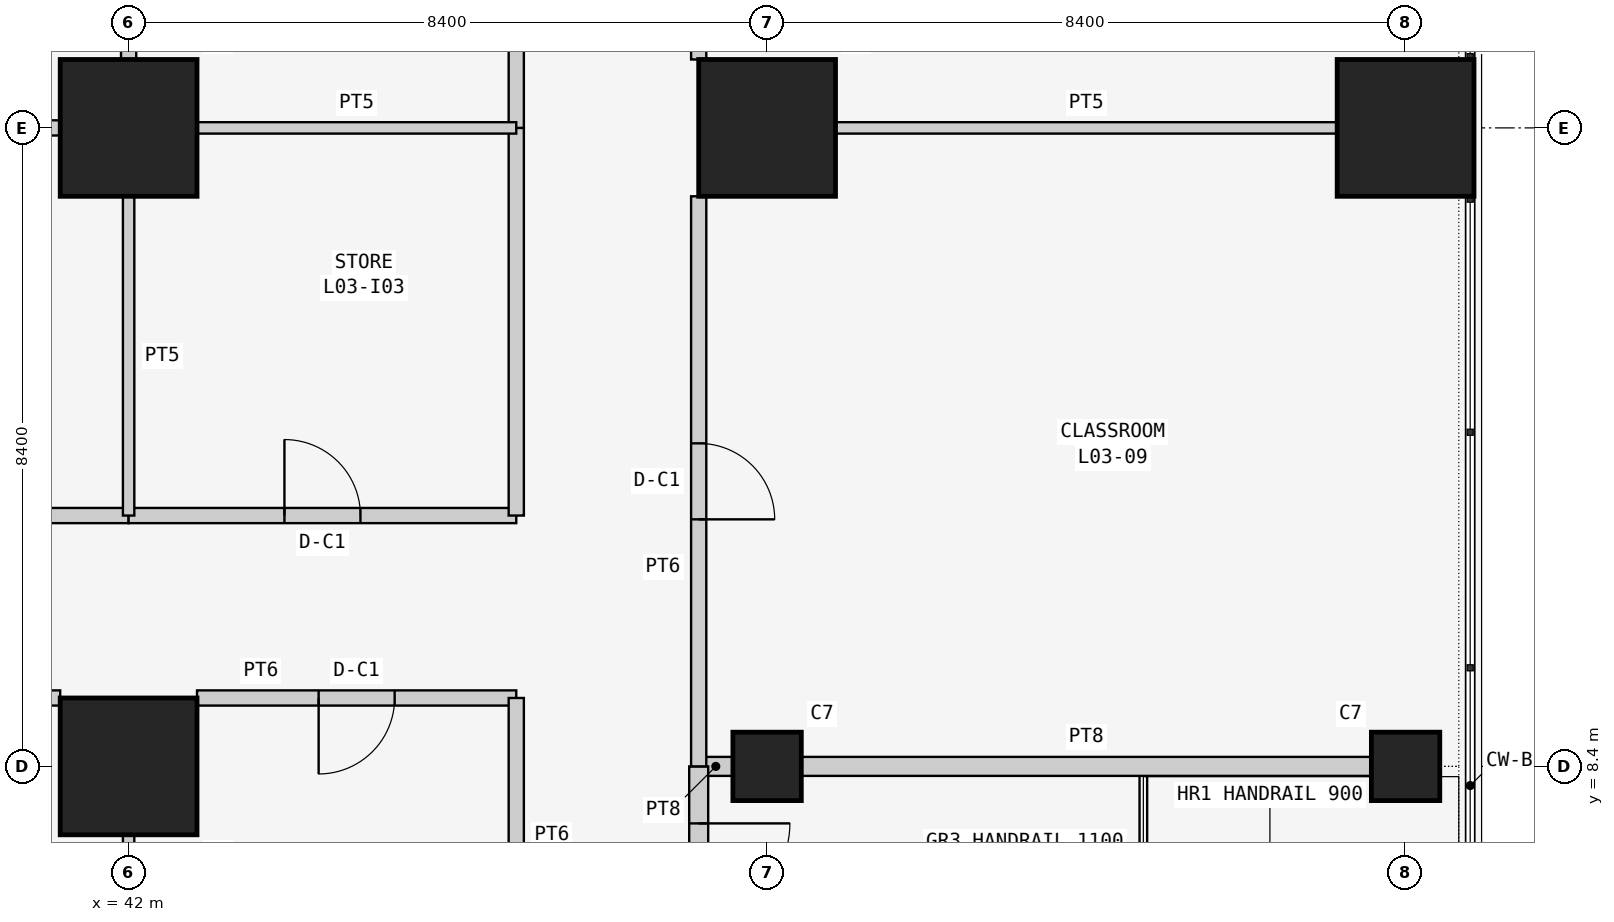
"""IFC4 building model, lengths in metres.
Left out: names, types, materials, properties, quantities, classifications, styles, units other than length and angle.
Written with IfcOpenShell. Run it as: python <this file> out.ifc"""

import sys

from ifc_helpers import new_model, si_unit, direction, frame, frame_2d, origin, origin_2d, place, context, subcontext, project, spatial, rectangle, extrude, element, fill, save


model = new_model("IFC4")
c1 = context("Model", 3, precision=1e-05, world=origin(), true_north=direction((0.0, 1.0)))
c2 = subcontext(c1, "Body", "Model", "MODEL_VIEW")
j1 = project(units=[si_unit("LENGTHUNIT", "METRE"), si_unit("PLANEANGLEUNIT", "RADIAN")], contexts=[c1])
p1 = place(None, origin())
s1 = spatial("IfcSite", under=j1, at=p1, CompositionType="ELEMENT")
p2 = place(p1, origin())
s2 = spatial("IfcBuilding", under=s1, at=p2, CompositionType="ELEMENT")
p3 = place(p2, frame((0.0, 0.0, 15.0)))
s3 = spatial("IfcBuildingStorey", under=s2, at=p3, CompositionType="ELEMENT", Elevation=15.0)
for number, where, z_axis, x_axis in (
    (1, (42.0, 8.4, 0.0), (0.0, 0.0, 1.0), (1.0, 0.0, 0.0)),
    (2, (42.0, 16.8, 0.0), (0.0, 0.0, 1.0), (1.0, 0.0, 0.0)),
):
    element("IfcColumn", number, at=place(p3, frame(where, z_axis=z_axis, x_axis=x_axis)), inside=s3, PredefinedType="COLUMN", context=c2, shape_type="SweptSolid", body=[
        extrude(rectangle(XDim=1.8, YDim=1.8, at=origin_2d()), origin(), (0.0, 0.0, 1.0), 4.5),
    ])
p4 = place(p3, frame((50.4, 8.4, 0.0), z_axis=(0.0, 0.0, 1.0), x_axis=(1.0, 0.0, 0.0)))
e3 = element("IfcColumn", 3, at=p4, inside=s3, PredefinedType="COLUMN", context=c2, shape_type="SweptSolid", body=[
    extrude(rectangle(XDim=0.9, YDim=0.9, at=origin_2d()), origin(), (0.0, 0.0, 1.0), 4.5),
])
p5 = place(p3, frame((50.4, 16.8, 0.0), z_axis=(0.0, 0.0, 1.0), x_axis=(1.0, 0.0, 0.0)))
e4 = element("IfcColumn", 4, at=p5, inside=s3, PredefinedType="COLUMN", context=c2, shape_type="SweptSolid", body=[
    extrude(rectangle(XDim=1.8, YDim=1.8, at=origin_2d()), origin(), (0.0, 0.0, 1.0), 4.5),
])
p6 = place(p3, frame((58.8, 8.4, 0.0), z_axis=(0.0, 0.0, 1.0), x_axis=(1.0, 0.0, 0.0)))
e5 = element("IfcColumn", 5, at=p6, inside=s3, PredefinedType="COLUMN", context=c2, shape_type="SweptSolid", body=[
    extrude(rectangle(XDim=0.9, YDim=0.9, at=origin_2d()), origin(), (0.0, 0.0, 1.0), 4.5),
])
p7 = place(p3, frame((58.8, 16.8, 0.0), z_axis=(0.0, 0.0, 1.0), x_axis=(1.0, 0.0, 0.0)))
e6 = element("IfcColumn", 6, at=p7, inside=s3, PredefinedType="COLUMN", context=c2, shape_type="SweptSolid", body=[
    extrude(rectangle(XDim=1.8, YDim=1.8, at=origin_2d()), origin(), (0.0, 0.0, 1.0), 4.5),
])
p8 = place(p3, frame((49.5, 8.4, 0.0), z_axis=(0.0, 0.0, 1.0), x_axis=(1.0, 0.0, 0.0)))
e7 = element("IfcWall", 7, at=p8, inside=s3, PredefinedType="SOLIDWALL", context=c2, shape_type="SweptSolid", body=[
    extrude(rectangle(XDim=0.45, YDim=0.25, at=frame_2d((0.225, 0.0))), origin(), (0.0, 0.0, 1.0), 3.543),
])
p9 = place(p3, frame((50.85, 8.4, 0.0), z_axis=(0.0, 0.0, 1.0), x_axis=(1.0, 0.0, 0.0)))
e8 = element("IfcWall", 8, at=p9, inside=s3, PredefinedType="SOLIDWALL", context=c2, shape_type="SweptSolid", body=[
    extrude(rectangle(XDim=7.5, YDim=0.25, at=frame_2d((3.75, 0.0))), origin(), (0.0, 0.0, 1.0), 3.543),
])
p10 = place(p3, frame((49.5, 5.7, 0.0), z_axis=(0.0, 0.0, 1.0), x_axis=(0.0, 1.0, 0.0)))
e9 = element("IfcWall", 9, at=p10, inside=s3, PredefinedType="SOLIDWALL", context=c2, shape_type="SweptSolid", body=[
    extrude(rectangle(XDim=2.7, YDim=0.25, at=frame_2d((1.35, 0.0))), origin(), (0.0, 0.0, 1.0), 4.3),
])
p11 = place(p10, frame((0.75, 0.0, 0.0)))
e10 = element("IfcOpeningElement", 10, at=p11, cuts=e9, PredefinedType="OPENING", context=c2, shape_type="SweptSolid", body=[
    extrude(rectangle(XDim=1.2, YDim=2.1, at=frame_2d((0.6, 1.05))), frame((0.0, 0.135, 0.0), z_axis=(0.0, -1.0, 0.0), x_axis=(1.0, 0.0, 0.0)), (0.0, 0.0, 1.0), 0.27),
])
p12 = place(p3, frame((42.0, 0.9, 0.0), z_axis=(0.0, 0.0, 1.0), x_axis=(0.0, 1.0, 0.0)))
e11 = element("IfcWall", 11, at=p12, inside=s3, PredefinedType="PARTITIONING", context=c2, shape_type="SweptSolid", body=[
    extrude(rectangle(XDim=6.6, YDim=0.15, at=frame_2d((3.3, 0.0))), origin(), (0.0, 0.0, 1.0), 3.543),
])
p13 = place(p3, frame((42.9, 9.3, 0.0), z_axis=(0.0, 0.0, 1.0), x_axis=(1.0, 0.0, 0.0)))
e12 = element("IfcWall", 12, at=p13, inside=s3, PredefinedType="PARTITIONING", context=c2, shape_type="SweptSolid", body=[
    extrude(rectangle(XDim=4.2, YDim=0.2, at=frame_2d((2.1, 0.0))), origin(), (0.0, 0.0, 1.0), 4.3),
])
p14 = place(p13, frame((1.6, 0.0, 0.0)))
e13 = element("IfcOpeningElement", 13, at=p14, cuts=e12, PredefinedType="OPENING", context=c2, shape_type="SweptSolid", body=[
    extrude(rectangle(XDim=1.0, YDim=2.1, at=frame_2d((0.5, 1.05))), frame((0.0, 0.11, 0.0), z_axis=(0.0, -1.0, 0.0), x_axis=(1.0, 0.0, 0.0)), (0.0, 0.0, 1.0), 0.22),
])
p15 = place(p3, frame((47.1, 9.3, 0.0), z_axis=(0.0, 0.0, 1.0), x_axis=(0.0, -1.0, 0.0)))
e14 = element("IfcWall", 14, at=p15, inside=s3, PredefinedType="PARTITIONING", context=c2, shape_type="SweptSolid", body=[
    extrude(rectangle(XDim=3.6, YDim=0.2, at=frame_2d((1.8, 0.0))), origin(), (0.0, 0.0, 1.0), 4.3),
])
p16 = place(p3, frame((34.5, 9.3, 0.0), z_axis=(0.0, 0.0, 1.0), x_axis=(1.0, 0.0, 0.0)))
e15 = element("IfcWall", 15, at=p16, inside=s3, PredefinedType="PARTITIONING", context=c2, shape_type="SweptSolid", body=[
    extrude(rectangle(XDim=6.6, YDim=0.2, at=frame_2d((3.3, 0.0))), origin(), (0.0, 0.0, 1.0), 4.3),
])
p17 = place(p16, frame((2.8, 0.0, 0.0)))
e16 = element("IfcOpeningElement", 16, at=p17, cuts=e15, PredefinedType="OPENING", context=c2, shape_type="SweptSolid", body=[
    extrude(rectangle(XDim=1.0, YDim=2.1, at=frame_2d((0.5, 1.05))), frame((0.0, 0.11, 0.0), z_axis=(0.0, -1.0, 0.0), x_axis=(1.0, 0.0, 0.0)), (0.0, 0.0, 1.0), 0.22),
])
p18 = place(p3, frame((51.3, 16.8, 0.0), z_axis=(0.0, 0.0, 1.0), x_axis=(1.0, 0.0, 0.0)))
e17 = element("IfcWall", 17, at=p18, inside=s3, PredefinedType="PARTITIONING", context=c2, shape_type="SweptSolid", body=[
    extrude(rectangle(XDim=6.6, YDim=0.15, at=frame_2d((3.3, 0.0))), origin(), (0.0, 0.0, 1.0), 3.543),
])
p19 = place(p3, frame((49.5, 8.4, 0.0), z_axis=(0.0, 0.0, 1.0), x_axis=(0.0, 1.0, 0.0)))
e18 = element("IfcWall", 18, at=p19, inside=s3, PredefinedType="PARTITIONING", context=c2, shape_type="SweptSolid", body=[
    extrude(rectangle(XDim=7.5, YDim=0.2, at=frame_2d((3.75, 0.0))), origin(), (0.0, 0.0, 1.0), 4.3),
])
p20 = place(p19, frame((3.25, 0.0, 0.0)))
e19 = element("IfcOpeningElement", 19, at=p20, cuts=e18, PredefinedType="OPENING", context=c2, shape_type="SweptSolid", body=[
    extrude(rectangle(XDim=1.0, YDim=2.1, at=frame_2d((0.5, 1.05))), frame((0.0, 0.11, 0.0), z_axis=(0.0, -1.0, 0.0), x_axis=(1.0, 0.0, 0.0)), (0.0, 0.0, 1.0), 0.22),
])
p21 = place(p3, frame((49.5, 17.7, 0.0), z_axis=(0.0, 0.0, 1.0), x_axis=(0.0, 1.0, 0.0)))
e20 = element("IfcWall", 20, at=p21, inside=s3, PredefinedType="PARTITIONING", context=c2, shape_type="SweptSolid", body=[
    extrude(rectangle(XDim=6.6, YDim=0.2, at=frame_2d((3.3, 0.0))), origin(), (0.0, 0.0, 1.0), 4.3),
])
p22 = place(p21, frame((2.8, 0.0, 0.0)))
e21 = element("IfcOpeningElement", 21, at=p22, cuts=e20, PredefinedType="OPENING", context=c2, shape_type="SweptSolid", body=[
    extrude(rectangle(XDim=1.0, YDim=2.1, at=frame_2d((0.5, 1.05))), frame((0.0, 0.11, 0.0), z_axis=(0.0, -1.0, 0.0), x_axis=(1.0, 0.0, 0.0)), (0.0, 0.0, 1.0), 0.22),
])
p23 = place(p3, frame((25.2, 11.7, 0.0), z_axis=(0.0, 0.0, 1.0), x_axis=(1.0, 0.0, 0.0)))
e22 = element("IfcWall", 22, at=p23, inside=s3, PredefinedType="PARTITIONING", context=c2, shape_type="SweptSolid", body=[
    extrude(rectangle(XDim=16.8, YDim=0.2, at=frame_2d((8.4, 0.0))), origin(), (0.0, 0.0, 1.0), 4.3),
])
p24 = place(p23, frame((7.9, 0.0, 0.0)))
e23 = element("IfcOpeningElement", 23, at=p24, cuts=e22, PredefinedType="OPENING", context=c2, shape_type="SweptSolid", body=[
    extrude(rectangle(XDim=1.0, YDim=2.1, at=frame_2d((0.5, 1.05))), frame((0.0, 0.11, 0.0), z_axis=(0.0, -1.0, 0.0), x_axis=(1.0, 0.0, 0.0)), (0.0, 0.0, 1.0), 0.22),
])
p25 = place(p3, frame((42.0, 11.7, 0.0), z_axis=(0.0, 0.0, 1.0), x_axis=(1.0, 0.0, 0.0)))
e24 = element("IfcWall", 24, at=p25, inside=s3, PredefinedType="PARTITIONING", context=c2, shape_type="SweptSolid", body=[
    extrude(rectangle(XDim=5.1, YDim=0.2, at=frame_2d((2.55, 0.0))), origin(), (0.0, 0.0, 1.0), 4.3),
])
p26 = place(p25, frame((2.05, 0.0, 0.0)))
e25 = element("IfcOpeningElement", 25, at=p26, cuts=e24, PredefinedType="OPENING", context=c2, shape_type="SweptSolid", body=[
    extrude(rectangle(XDim=1.0, YDim=2.1, at=frame_2d((0.5, 1.05))), frame((0.0, 0.11, 0.0), z_axis=(0.0, -1.0, 0.0), x_axis=(1.0, 0.0, 0.0)), (0.0, 0.0, 1.0), 0.22),
])
p27 = place(p3, frame((47.1, 11.7, 0.0), z_axis=(0.0, 0.0, 1.0), x_axis=(0.0, 1.0, 0.0)))
e26 = element("IfcWall", 26, at=p27, inside=s3, PredefinedType="PARTITIONING", context=c2, shape_type="SweptSolid", body=[
    extrude(rectangle(XDim=5.1, YDim=0.2, at=frame_2d((2.55, 0.0))), origin(), (0.0, 0.0, 1.0), 4.3),
])
p28 = place(p3, frame((47.1, 16.8, 0.0), z_axis=(0.0, 0.0, 1.0), x_axis=(0.0, 1.0, 0.0)))
e27 = element("IfcWall", 27, at=p28, inside=s3, PredefinedType="PARTITIONING", context=c2, shape_type="SweptSolid", body=[
    extrude(rectangle(XDim=8.4, YDim=0.2, at=frame_2d((4.2, 0.0))), origin(), (0.0, 0.0, 1.0), 4.3),
])
p29 = place(p28, frame((3.7, 0.0, 0.0)))
e28 = element("IfcOpeningElement", 28, at=p29, cuts=e27, PredefinedType="OPENING", context=c2, shape_type="SweptSolid", body=[
    extrude(rectangle(XDim=1.0, YDim=2.1, at=frame_2d((0.5, 1.05))), frame((0.0, 0.11, 0.0), z_axis=(0.0, -1.0, 0.0), x_axis=(1.0, 0.0, 0.0)), (0.0, 0.0, 1.0), 0.22),
])
p30 = place(p3, frame((41.1, 16.8, 0.0), z_axis=(0.0, 0.0, 1.0), x_axis=(-1.0, 0.0, 0.0)))
e29 = element("IfcWall", 29, at=p30, inside=s3, PredefinedType="PARTITIONING", context=c2, shape_type="SweptSolid", body=[
    extrude(rectangle(XDim=2.8, YDim=0.2, at=frame_2d((1.4, 0.0))), origin(), (0.0, 0.0, 1.0), 3.543),
])
p31 = place(p3, frame((42.0, 24.3, 0.0), z_axis=(0.0, 0.0, 1.0), x_axis=(0.0, -1.0, 0.0)))
e30 = element("IfcWall", 30, at=p31, inside=s3, PredefinedType="PARTITIONING", context=c2, shape_type="SweptSolid", body=[
    extrude(rectangle(XDim=6.6, YDim=0.2, at=frame_2d((3.3, 0.0))), origin(), (0.0, 0.0, 1.0), 3.543),
])
p32 = place(p3, frame((42.0, 15.9, 0.0), z_axis=(0.0, 0.0, 1.0), x_axis=(0.0, -1.0, 0.0)))
e31 = element("IfcWall", 31, at=p32, inside=s3, PredefinedType="PARTITIONING", context=c2, shape_type="SweptSolid", body=[
    extrude(rectangle(XDim=4.2, YDim=0.15, at=frame_2d((2.1, 0.0))), origin(), (0.0, 0.0, 1.0), 3.543),
])
p33 = place(p3, frame((42.9, 16.8, 0.0), z_axis=(0.0, 0.0, 1.0), x_axis=(1.0, 0.0, 0.0)))
e32 = element("IfcWall", 32, at=p33, inside=s3, PredefinedType="PARTITIONING", context=c2, shape_type="SweptSolid", body=[
    extrude(rectangle(XDim=4.2, YDim=0.15, at=frame_2d((2.1, 0.0))), origin(), (0.0, 0.0, 1.0), 3.543),
])
p34 = place(p11, frame((1.2, 0.0, 0.0), z_axis=(0.0, 0.0, 1.0), x_axis=(-1.0, 0.0, 0.0)))
e33 = element("IfcDoor", 33, at=p34, inside=s3, OperationType="SINGLE_SWING_LEFT", PredefinedType="DOOR", context=c2, shape_type="SweptSolid", body=[
    extrude(rectangle(XDim=1.2, YDim=2.1, at=frame_2d((0.6, 1.05))), frame((0.0, 0.025, 0.0), z_axis=(0.0, -1.0, 0.0), x_axis=(1.0, 0.0, 0.0)), (0.0, 0.0, 1.0), 0.05),
])
fill(e10, e33)
p35 = place(p14, frame((1.0, 0.0, 0.0), z_axis=(0.0, 0.0, 1.0), x_axis=(-1.0, 0.0, 0.0)))
e34 = element("IfcDoor", 34, at=p35, inside=s3, OperationType="SINGLE_SWING_RIGHT", PredefinedType="DOOR", context=c2, shape_type="SweptSolid", body=[
    extrude(rectangle(XDim=1.0, YDim=2.1, at=frame_2d((0.5, 1.05))), frame((0.0, 0.025, 0.0), z_axis=(0.0, -1.0, 0.0), x_axis=(1.0, 0.0, 0.0)), (0.0, 0.0, 1.0), 0.05),
])
fill(e13, e34)
p36 = place(p20, frame((1.0, 0.0, 0.0), z_axis=(0.0, 0.0, 1.0), x_axis=(-1.0, 0.0, 0.0)))
e35 = element("IfcDoor", 35, at=p36, inside=s3, OperationType="SINGLE_SWING_RIGHT", PredefinedType="DOOR", context=c2, shape_type="SweptSolid", body=[
    extrude(rectangle(XDim=1.0, YDim=2.1, at=frame_2d((0.5, 1.05))), frame((0.0, 0.025, 0.0), z_axis=(0.0, -1.0, 0.0), x_axis=(1.0, 0.0, 0.0)), (0.0, 0.0, 1.0), 0.05),
])
fill(e19, e35)
p37 = place(p26, origin())
e36 = element("IfcDoor", 36, at=p37, inside=s3, OperationType="SINGLE_SWING_LEFT", PredefinedType="DOOR", context=c2, shape_type="SweptSolid", body=[
    extrude(rectangle(XDim=1.0, YDim=2.1, at=frame_2d((0.5, 1.05))), frame((0.0, 0.025, 0.0), z_axis=(0.0, -1.0, 0.0), x_axis=(1.0, 0.0, 0.0)), (0.0, 0.0, 1.0), 0.05),
])
fill(e25, e36)
save(model, sys.argv[1])
